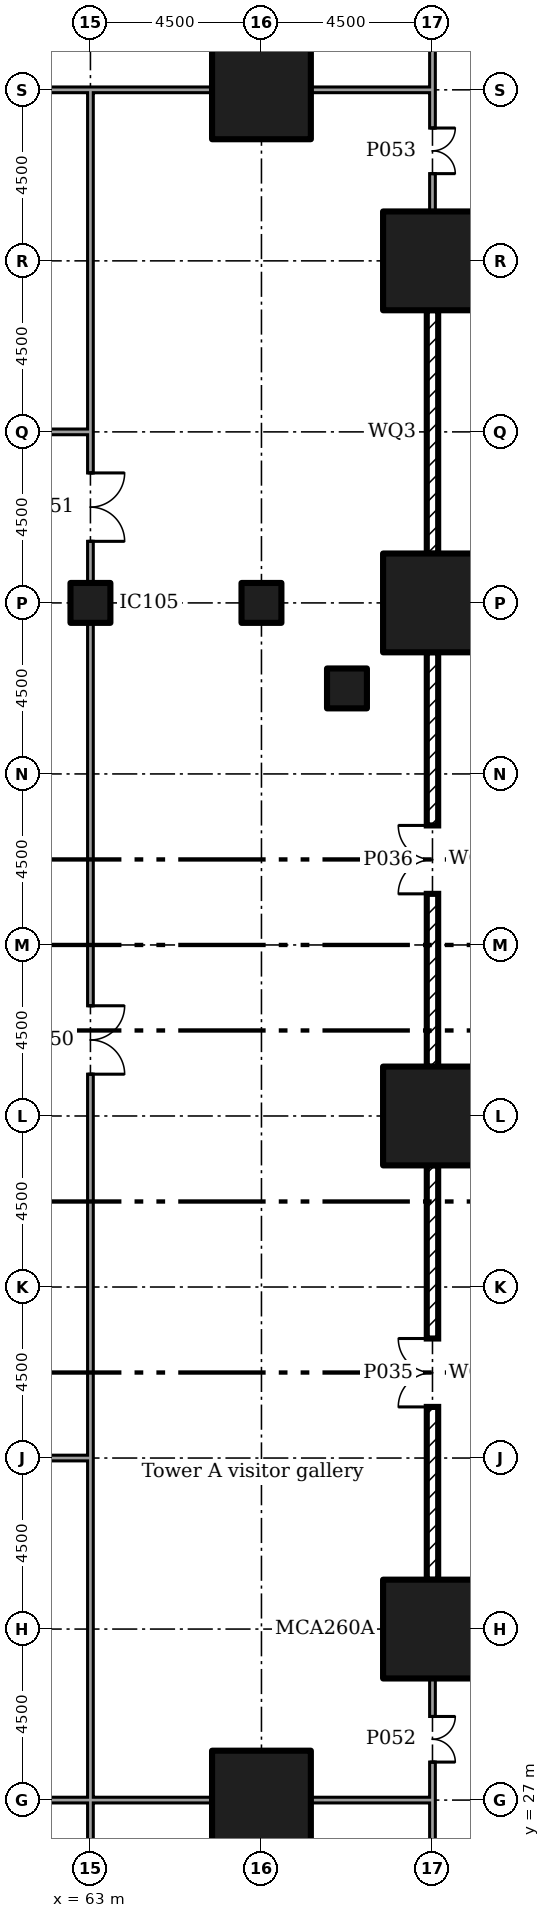
"""IFC4 building model, lengths in metres.
Left out: names, types, materials, properties, quantities, classifications, styles, units other than length and angle.
Written with IfcOpenShell. Run it as: python <this file> out.ifc"""

import sys

from ifc_helpers import new_model, si_unit, direction, frame, frame_2d, origin, origin_2d, place, context, subcontext, project, spatial, rectangle, extrude, element, fill, save


model = new_model("IFC4")
c1 = context("Model", 3, precision=1e-05, world=origin(), true_north=direction((0.0, 1.0)))
c2 = subcontext(c1, "Body", "Model", "MODEL_VIEW")
j1 = project(units=[si_unit("LENGTHUNIT", "METRE"), si_unit("PLANEANGLEUNIT", "RADIAN")], contexts=[c1])
p1 = place(None, origin())
s1 = spatial("IfcSite", under=j1, at=p1, CompositionType="ELEMENT")
p2 = place(p1, origin())
s2 = spatial("IfcBuilding", under=s1, at=p2, CompositionType="ELEMENT")
p3 = place(p2, frame((0.0, 0.0, 6.0)))
s3 = spatial("IfcBuildingStorey", under=s2, at=p3, CompositionType="ELEMENT", Elevation=6.0)
for number, where in (
    (1, (67.5, 27.0, 0.0)),
    (2, (67.5, 72.0, 0.0)),
    (3, (72.0, 31.5, 0.0)),
    (4, (72.0, 45.0, 0.0)),
    (5, (72.0, 58.5, 0.0)),
    (6, (72.0, 67.5, 0.0)),
):
    element("IfcColumn", number, at=place(p3, frame(where)), inside=s3, PredefinedType="COLUMN", context=c2, shape_type="SweptSolid", body=[
        extrude(rectangle(XDim=2.6, YDim=2.6, at=origin_2d()), origin(), (0.0, 0.0, 1.0), 5.5),
    ])
for number, where in (
    (7, (63.0, 58.5, 0.0)),
    (8, (67.5, 58.5, 0.0)),
    (9, (69.75, 56.25, 0.0)),
):
    element("IfcColumn", number, at=place(p3, frame(where)), inside=s3, PredefinedType="COLUMN", context=c2, shape_type="SweptSolid", body=[
        extrude(rectangle(XDim=1.05, YDim=1.05, at=origin_2d()), origin(), (0.0, 0.0, 1.0), 5.5),
    ])
p4 = place(p3, frame((72.0, 32.795, 0.0), z_axis=(0.0, 0.0, 1.0), x_axis=(0.0, 1.0, 0.0)))
e10 = element("IfcWall", 10, at=p4, inside=s3, PredefinedType="SOLIDWALL", context=c2, shape_type="SweptSolid", body=[
    extrude(rectangle(XDim=10.91, YDim=0.3, at=frame_2d((5.455, 0.0))), origin(), (0.0, 0.0, 1.0), 10.05),
])
p5 = place(p4, frame((4.55, 0.0, 0.0)))
e11 = element("IfcOpeningElement", 11, at=p5, cuts=e10, PredefinedType="OPENING", context=c2, shape_type="SweptSolid", body=[
    extrude(rectangle(XDim=1.8, YDim=2.1, at=frame_2d((0.9, 1.05))), frame((0.0, 0.16, 0.0), z_axis=(0.0, -1.0, 0.0), x_axis=(1.0, 0.0, 0.0)), (0.0, 0.0, 1.0), 0.32),
])
p6 = place(p3, frame((72.0, 46.295, 0.0), z_axis=(0.0, 0.0, 1.0), x_axis=(0.0, 1.0, 0.0)))
e12 = element("IfcWall", 12, at=p6, inside=s3, PredefinedType="SOLIDWALL", context=c2, shape_type="SweptSolid", body=[
    extrude(rectangle(XDim=10.91, YDim=0.3, at=frame_2d((5.455, 0.0))), origin(), (0.0, 0.0, 1.0), 10.05),
])
p7 = place(p6, frame((4.55, 0.0, 0.0)))
e13 = element("IfcOpeningElement", 13, at=p7, cuts=e12, PredefinedType="OPENING", context=c2, shape_type="SweptSolid", body=[
    extrude(rectangle(XDim=1.8, YDim=2.1, at=frame_2d((0.9, 1.05))), frame((0.0, 0.16, 0.0), z_axis=(0.0, -1.0, 0.0), x_axis=(1.0, 0.0, 0.0)), (0.0, 0.0, 1.0), 0.32),
])
p8 = place(p3, frame((72.0, 59.795, 0.0), z_axis=(0.0, 0.0, 1.0), x_axis=(0.0, 1.0, 0.0)))
e14 = element("IfcWall", 14, at=p8, inside=s3, PredefinedType="SOLIDWALL", context=c2, shape_type="SweptSolid", body=[
    extrude(rectangle(XDim=6.41, YDim=0.3, at=frame_2d((3.205, 0.0))), origin(), (0.0, 0.0, 1.0), 10.05),
])
p9 = place(p3, frame((63.0, 23.05, 0.0), z_axis=(0.0, 0.0, 1.0), x_axis=(0.0, 1.0, 0.0)))
e15 = element("IfcWall", 15, at=p9, inside=s3, PredefinedType="PARTITIONING", context=c2, shape_type="SweptSolid", body=[
    extrude(rectangle(XDim=4.025, YDim=0.15, at=frame_2d((2.012, 0.0))), origin(), (0.0, 0.0, 1.0), 5.05),
])
p10 = place(p3, frame((60.075, 27.0, 0.0)))
e16 = element("IfcWall", 16, at=p10, inside=s3, PredefinedType="PARTITIONING", context=c2, shape_type="SweptSolid", body=[
    extrude(rectangle(XDim=3.0, YDim=0.15, at=frame_2d((1.5, 0.0))), origin(), (0.0, 0.0, 1.0), 5.05),
])
p11 = place(p3, frame((63.075, 27.0, 0.0)))
e17 = element("IfcWall", 17, at=p11, inside=s3, PredefinedType="PARTITIONING", context=c2, shape_type="SweptSolid", body=[
    extrude(rectangle(XDim=3.13, YDim=0.15, at=frame_2d((1.565, 0.0))), origin(), (0.0, 0.0, 1.0), 5.05),
])
p12 = place(p3, frame((68.795, 27.0, 0.0)))
e18 = element("IfcWall", 18, at=p12, inside=s3, PredefinedType="PARTITIONING", context=c2, shape_type="SweptSolid", body=[
    extrude(rectangle(XDim=3.28, YDim=0.15, at=frame_2d((1.64, 0.0))), origin(), (0.0, 0.0, 1.0), 5.05),
])
p13 = place(p3, frame((72.0, 22.5, 0.0), z_axis=(0.0, 0.0, 1.0), x_axis=(0.0, 1.0, 0.0)))
e19 = element("IfcWall", 19, at=p13, inside=s3, PredefinedType="PARTITIONING", context=c2, shape_type="SweptSolid", body=[
    extrude(rectangle(XDim=4.425, YDim=0.15, at=frame_2d((2.212, 0.0))), origin(), (0.0, 0.0, 1.0), 5.05),
])
for number, where in (
    (20, (62.925, 72.0, 0.0)),
    (21, (68.795, 72.0, 0.0)),
):
    element("IfcWall", number, at=place(p3, frame(where)), inside=s3, PredefinedType="PARTITIONING", context=c2, shape_type="SweptSolid", body=[
        extrude(rectangle(XDim=3.28, YDim=0.15, at=frame_2d((1.64, 0.0))), origin(), (0.0, 0.0, 1.0), 5.05),
    ])
p14 = place(p3, frame((59.795, 72.0, 0.0)))
e22 = element("IfcWall", 22, at=p14, inside=s3, PredefinedType="PARTITIONING", context=c2, shape_type="SweptSolid", body=[
    extrude(rectangle(XDim=3.205, YDim=0.15, at=frame_2d((1.603, 0.0))), origin(), (0.0, 0.0, 1.0), 5.05),
])
p15 = place(p3, frame((72.0, 72.0, 0.0), z_axis=(0.0, 0.0, 1.0), x_axis=(0.0, 1.0, 0.0)))
e23 = element("IfcWall", 23, at=p15, inside=s3, PredefinedType="PARTITIONING", context=c2, shape_type="SweptSolid", body=[
    extrude(rectangle(XDim=4.5, YDim=0.15, at=frame_2d((2.25, 0.0))), origin(), (0.0, 0.0, 1.0), 5.05),
])
for number, where, z_axis, x_axis in (
    (24, (63.0, 27.075, 0.0), (0.0, 0.0, 1.0), (0.0, 1.0, 0.0)),
    (25, (63.0, 62.925, 0.0), (0.0, 0.0, 1.0), (0.0, 1.0, 0.0)),
):
    element("IfcWall", number, at=place(p3, frame(where, z_axis=z_axis, x_axis=x_axis)), inside=s3, PredefinedType="PARTITIONING", context=c2, shape_type="SweptSolid", body=[
        extrude(rectangle(XDim=9.0, YDim=0.15, at=frame_2d((4.5, 0.0))), origin(), (0.0, 0.0, 1.0), 5.05),
    ])
p16 = place(p3, frame((63.0, 36.0, 0.0), z_axis=(0.0, 0.0, 1.0), x_axis=(0.0, 1.0, 0.0)))
e26 = element("IfcWall", 26, at=p16, inside=s3, PredefinedType="PARTITIONING", context=c2, shape_type="SweptSolid", body=[
    extrude(rectangle(XDim=21.98, YDim=0.15, at=frame_2d((10.99, 0.0))), origin(), (0.0, 0.0, 1.0), 5.05),
])
p17 = place(p16, frame((10.1, 0.0, 0.0)))
e27 = element("IfcOpeningElement", 27, at=p17, cuts=e26, PredefinedType="OPENING", context=c2, shape_type="SweptSolid", body=[
    extrude(rectangle(XDim=1.8, YDim=2.1, at=frame_2d((0.9, 1.05))), frame((0.0, 0.085, 0.0), z_axis=(0.0, -1.0, 0.0), x_axis=(1.0, 0.0, 0.0)), (0.0, 0.0, 1.0), 0.17),
])
p18 = place(p3, frame((63.0, 59.02, 0.0), z_axis=(0.0, 0.0, 1.0), x_axis=(0.0, 1.0, 0.0)))
e28 = element("IfcWall", 28, at=p18, inside=s3, PredefinedType="PARTITIONING", context=c2, shape_type="SweptSolid", body=[
    extrude(rectangle(XDim=3.98, YDim=0.15, at=frame_2d((1.99, 0.0))), origin(), (0.0, 0.0, 1.0), 5.05),
])
p19 = place(p18, frame((1.1, 0.0, 0.0)))
e29 = element("IfcOpeningElement", 29, at=p19, cuts=e28, PredefinedType="OPENING", context=c2, shape_type="SweptSolid", body=[
    extrude(rectangle(XDim=1.8, YDim=2.1, at=frame_2d((0.9, 1.05))), frame((0.0, 0.085, 0.0), z_axis=(0.0, -1.0, 0.0), x_axis=(1.0, 0.0, 0.0)), (0.0, 0.0, 1.0), 0.17),
])
p20 = place(p3, frame((72.0, 27.0, 0.0), z_axis=(0.0, 0.0, 1.0), x_axis=(0.0, 1.0, 0.0)))
e30 = element("IfcWall", 30, at=p20, inside=s3, PredefinedType="PARTITIONING", context=c2, shape_type="SweptSolid", body=[
    extrude(rectangle(XDim=3.205, YDim=0.15, at=frame_2d((1.603, 0.0))), origin(), (0.0, 0.0, 1.0), 5.05),
])
p21 = place(p20, frame((1.0, 0.0, 0.0)))
e31 = element("IfcOpeningElement", 31, at=p21, cuts=e30, PredefinedType="OPENING", context=c2, shape_type="SweptSolid", body=[
    extrude(rectangle(XDim=1.2, YDim=2.1, at=frame_2d((0.6, 1.05))), frame((0.0, 0.085, 0.0), z_axis=(0.0, -1.0, 0.0), x_axis=(1.0, 0.0, 0.0)), (0.0, 0.0, 1.0), 0.17),
])
p22 = place(p3, frame((72.0, 68.795, 0.0), z_axis=(0.0, 0.0, 1.0), x_axis=(0.0, 1.0, 0.0)))
e32 = element("IfcWall", 32, at=p22, inside=s3, PredefinedType="PARTITIONING", context=c2, shape_type="SweptSolid", body=[
    extrude(rectangle(XDim=3.13, YDim=0.15, at=frame_2d((1.565, 0.0))), origin(), (0.0, 0.0, 1.0), 5.05),
])
p23 = place(p22, frame((1.0, 0.0, 0.0)))
e33 = element("IfcOpeningElement", 33, at=p23, cuts=e32, PredefinedType="OPENING", context=c2, shape_type="SweptSolid", body=[
    extrude(rectangle(XDim=1.2, YDim=2.1, at=frame_2d((0.6, 1.05))), frame((0.0, 0.085, 0.0), z_axis=(0.0, -1.0, 0.0), x_axis=(1.0, 0.0, 0.0)), (0.0, 0.0, 1.0), 0.17),
])
p24 = place(p3, frame((59.02, 36.0, 0.0)))
e34 = element("IfcWall", 34, at=p24, inside=s3, PredefinedType="PARTITIONING", context=c2, shape_type="SweptSolid", body=[
    extrude(rectangle(XDim=3.905, YDim=0.15, at=frame_2d((1.953, 0.0))), origin(), (0.0, 0.0, 1.0), 5.05),
])
p25 = place(p3, frame((41.02, 63.0, 0.0)))
e35 = element("IfcWall", 35, at=p25, inside=s3, PredefinedType="PARTITIONING", context=c2, shape_type="SweptSolid", body=[
    extrude(rectangle(XDim=21.905, YDim=0.15, at=frame_2d((10.953, 0.0))), origin(), (0.0, 0.0, 1.0), 5.05),
])
p26 = place(p25, frame((10.5, 0.0, 0.0)))
e36 = element("IfcOpeningElement", 36, at=p26, cuts=e35, PredefinedType="OPENING", context=c2, shape_type="SweptSolid", body=[
    extrude(rectangle(XDim=1.0, YDim=2.1, at=frame_2d((0.5, 1.05))), frame((0.0, 0.085, 0.0), z_axis=(0.0, -1.0, 0.0), x_axis=(1.0, 0.0, 0.0)), (0.0, 0.0, 1.0), 0.17),
])
p27 = place(p5, origin())
e37 = element("IfcDoor", 37, at=p27, inside=s3, OperationType="DOUBLE_DOOR_SINGLE_SWING", PredefinedType="DOOR", context=c2, shape_type="SweptSolid", body=[
    extrude(rectangle(XDim=1.8, YDim=2.1, at=frame_2d((0.9, 1.05))), frame((0.0, 0.025, 0.0), z_axis=(0.0, -1.0, 0.0), x_axis=(1.0, 0.0, 0.0)), (0.0, 0.0, 1.0), 0.05),
])
fill(e11, e37)
p28 = place(p7, origin())
e38 = element("IfcDoor", 38, at=p28, inside=s3, OperationType="DOUBLE_DOOR_SINGLE_SWING", PredefinedType="DOOR", context=c2, shape_type="SweptSolid", body=[
    extrude(rectangle(XDim=1.8, YDim=2.1, at=frame_2d((0.9, 1.05))), frame((0.0, 0.025, 0.0), z_axis=(0.0, -1.0, 0.0), x_axis=(1.0, 0.0, 0.0)), (0.0, 0.0, 1.0), 0.05),
])
fill(e13, e38)
p29 = place(p17, frame((1.8, 0.0, 0.0), x_axis=(-1.0, 0.0, 0.0)))
e39 = element("IfcDoor", 39, at=p29, inside=s3, OperationType="DOUBLE_DOOR_SINGLE_SWING", PredefinedType="DOOR", context=c2, shape_type="SweptSolid", body=[
    extrude(rectangle(XDim=1.8, YDim=2.1, at=frame_2d((0.9, 1.05))), frame((0.0, 0.025, 0.0), z_axis=(0.0, -1.0, 0.0), x_axis=(1.0, 0.0, 0.0)), (0.0, 0.0, 1.0), 0.05),
])
fill(e27, e39)
p30 = place(p19, frame((1.8, 0.0, 0.0), x_axis=(-1.0, 0.0, 0.0)))
e40 = element("IfcDoor", 40, at=p30, inside=s3, OperationType="DOUBLE_DOOR_SINGLE_SWING", PredefinedType="DOOR", context=c2, shape_type="SweptSolid", body=[
    extrude(rectangle(XDim=1.8, YDim=2.1, at=frame_2d((0.9, 1.05))), frame((0.0, 0.025, 0.0), z_axis=(0.0, -1.0, 0.0), x_axis=(1.0, 0.0, 0.0)), (0.0, 0.0, 1.0), 0.05),
])
fill(e29, e40)
p31 = place(p21, frame((1.2, 0.0, 0.0), x_axis=(-1.0, 0.0, 0.0)))
e41 = element("IfcDoor", 41, at=p31, inside=s3, OperationType="DOUBLE_DOOR_SINGLE_SWING", PredefinedType="DOOR", context=c2, shape_type="SweptSolid", body=[
    extrude(rectangle(XDim=1.2, YDim=2.1, at=frame_2d((0.6, 1.05))), frame((0.0, 0.025, 0.0), z_axis=(0.0, -1.0, 0.0), x_axis=(1.0, 0.0, 0.0)), (0.0, 0.0, 1.0), 0.05),
])
fill(e31, e41)
p32 = place(p23, frame((1.2, 0.0, 0.0), x_axis=(-1.0, 0.0, 0.0)))
e42 = element("IfcDoor", 42, at=p32, inside=s3, OperationType="DOUBLE_DOOR_SINGLE_SWING", PredefinedType="DOOR", context=c2, shape_type="SweptSolid", body=[
    extrude(rectangle(XDim=1.2, YDim=2.1, at=frame_2d((0.6, 1.05))), frame((0.0, 0.025, 0.0), z_axis=(0.0, -1.0, 0.0), x_axis=(1.0, 0.0, 0.0)), (0.0, 0.0, 1.0), 0.05),
])
fill(e33, e42)
save(model, sys.argv[1])
